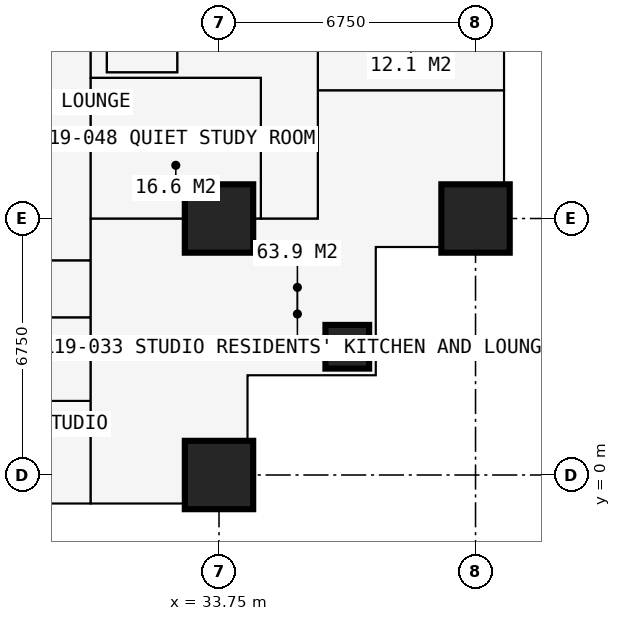
"""IFC4 building model, lengths in metres.
Left out: names, types, materials, properties, quantities, classifications, styles, units other than length and angle.
Written with IfcOpenShell. Run it as: python <this file> out.ifc"""

import sys

from ifc_helpers import new_model, si_unit, direction, frame, frame_2d, origin, origin_2d, place, context, subcontext, project, spatial, rectangle, extrude, element, fill, save


model = new_model("IFC4")
c1 = context("Model", 3, precision=1e-05, world=origin(), true_north=direction((0.0, 1.0)))
c2 = subcontext(c1, "Body", "Model", "MODEL_VIEW")
j1 = project(units=[si_unit("LENGTHUNIT", "METRE"), si_unit("PLANEANGLEUNIT", "RADIAN")], contexts=[c1])
p1 = place(None, origin())
s1 = spatial("IfcSite", under=j1, at=p1, CompositionType="ELEMENT")
p2 = place(p1, origin())
s2 = spatial("IfcBuilding", under=s1, at=p2, CompositionType="ELEMENT")
p3 = place(p2, frame((0.0, 0.0, 72.0)))
s3 = spatial("IfcBuildingStorey", under=s2, at=p3, CompositionType="ELEMENT", Elevation=72.0)
for number, where, z_axis, x_axis in (
    (1, (33.75, 0.0, 0.0), (0.0, 0.0, 1.0), (1.0, 0.0, 0.0)),
    (2, (33.75, 6.75, 0.0), (0.0, 0.0, 1.0), (1.0, 0.0, 0.0)),
):
    element("IfcColumn", number, at=place(p3, frame(where, z_axis=z_axis, x_axis=x_axis)), inside=s3, PredefinedType="COLUMN", context=c2, shape_type="SweptSolid", body=[
        extrude(rectangle(XDim=1.8, YDim=1.8, at=origin_2d()), origin(), (0.0, 0.0, 1.0), 3.6),
    ])
p4 = place(p3, frame((37.125, 3.375, 0.0), z_axis=(0.0, 0.0, 1.0), x_axis=(1.0, 0.0, 0.0)))
e3 = element("IfcColumn", 3, at=p4, inside=s3, PredefinedType="COLUMN", context=c2, shape_type="SweptSolid", body=[
    extrude(rectangle(XDim=1.15, YDim=1.15, at=origin_2d()), origin(), (0.0, 0.0, 1.0), 3.6),
])
p5 = place(p3, frame((40.5, 6.75, 0.0), z_axis=(0.0, 0.0, 1.0), x_axis=(1.0, 0.0, 0.0)))
e4 = element("IfcColumn", 4, at=p5, inside=s3, PredefinedType="COLUMN", context=c2, shape_type="SweptSolid", body=[
    extrude(rectangle(XDim=1.8, YDim=1.8, at=origin_2d()), origin(), (0.0, 0.0, 1.0), 3.6),
])
p6 = place(p3, frame((34.5, -0.75, 0.0), z_axis=(0.0, 0.0, 1.0), x_axis=(0.0, 1.0, 0.0)))
e5 = element("IfcWall", 5, at=p6, inside=s3, PredefinedType="SOLIDWALL", context=c2, shape_type="SweptSolid", body=[
    extrude(rectangle(XDim=3.375, YDim=0.3, at=frame_2d((1.688, 0.0))), origin(), (0.0, 0.0, 1.0), 3.3),
])
p7 = place(p6, frame((1.833, 0.0, 0.9)))
e6 = element("IfcOpeningElement", 6, at=p7, cuts=e5, PredefinedType="OPENING", context=c2, shape_type="SweptSolid", body=[
    extrude(rectangle(XDim=1.2, YDim=1.8, at=frame_2d((0.6, 0.9))), frame((0.0, 0.16, 0.0), z_axis=(0.0, -1.0, 0.0), x_axis=(1.0, 0.0, 0.0)), (0.0, 0.0, 1.0), 0.32),
])
p8 = place(p3, frame((34.5, 2.625, 0.0), z_axis=(0.0, 0.0, 1.0), x_axis=(1.0, 0.0, 0.0)))
e7 = element("IfcWall", 7, at=p8, inside=s3, PredefinedType="SOLIDWALL", context=c2, shape_type="SweptSolid", body=[
    extrude(rectangle(XDim=3.375, YDim=0.3, at=frame_2d((1.688, 0.0))), origin(), (0.0, 0.0, 1.0), 3.3),
])
p9 = place(p8, frame((0.788, 0.0, 0.6)))
e8 = element("IfcOpeningElement", 8, at=p9, cuts=e7, PredefinedType="OPENING", context=c2, shape_type="SweptSolid", body=[
    extrude(rectangle(XDim=1.8, YDim=2.1, at=frame_2d((0.9, 1.05))), frame((0.0, 0.16, 0.0), z_axis=(0.0, -1.0, 0.0), x_axis=(1.0, 0.0, 0.0)), (0.0, 0.0, 1.0), 0.32),
])
p10 = place(p3, frame((37.875, 2.625, 0.0), z_axis=(0.0, 0.0, 1.0), x_axis=(0.0, 1.0, 0.0)))
e9 = element("IfcWall", 9, at=p10, inside=s3, PredefinedType="SOLIDWALL", context=c2, shape_type="SweptSolid", body=[
    extrude(rectangle(XDim=3.375, YDim=0.3, at=frame_2d((1.688, 0.0))), origin(), (0.0, 0.0, 1.0), 3.3),
])
p11 = place(p10, frame((0.788, 0.0, 0.6)))
e10 = element("IfcOpeningElement", 10, at=p11, cuts=e9, PredefinedType="OPENING", context=c2, shape_type="SweptSolid", body=[
    extrude(rectangle(XDim=1.8, YDim=2.1, at=frame_2d((0.9, 1.05))), frame((0.0, 0.16, 0.0), z_axis=(0.0, -1.0, 0.0), x_axis=(1.0, 0.0, 0.0)), (0.0, 0.0, 1.0), 0.32),
])
p12 = place(p3, frame((37.875, 6.0, 0.0), z_axis=(0.0, 0.0, 1.0), x_axis=(1.0, 0.0, 0.0)))
e11 = element("IfcWall", 11, at=p12, inside=s3, PredefinedType="SOLIDWALL", context=c2, shape_type="SweptSolid", body=[
    extrude(rectangle(XDim=3.375, YDim=0.3, at=frame_2d((1.688, 0.0))), origin(), (0.0, 0.0, 1.0), 3.3),
])
p13 = place(p12, frame((0.343, 0.0, 0.9)))
e12 = element("IfcOpeningElement", 12, at=p13, cuts=e11, PredefinedType="OPENING", context=c2, shape_type="SweptSolid", body=[
    extrude(rectangle(XDim=1.2, YDim=1.8, at=frame_2d((0.6, 0.9))), frame((0.0, 0.16, 0.0), z_axis=(0.0, -1.0, 0.0), x_axis=(1.0, 0.0, 0.0)), (0.0, 0.0, 1.0), 0.32),
])
p14 = place(p3, frame((6.75, 4.15, 0.0), z_axis=(0.0, 0.0, 1.0), x_axis=(1.0, 0.0, 0.0)))
e13 = element("IfcWall", 13, at=p14, inside=s3, PredefinedType="PARTITIONING", context=c2, shape_type="SweptSolid", body=[
    extrude(rectangle(XDim=23.625, YDim=0.1, at=frame_2d((11.812, 0.0))), origin(), (0.0, 0.0, 1.0), 3.3),
])
p15 = place(p14, frame((0.2, 0.0, 0.0)))
e14 = element("IfcOpeningElement", 14, at=p15, cuts=e13, PredefinedType="OPENING", context=c2, shape_type="SweptSolid", body=[
    extrude(rectangle(XDim=0.95, YDim=2.2, at=frame_2d((0.475, 1.1))), frame((0.0, 0.06, 0.0), z_axis=(0.0, -1.0, 0.0), x_axis=(1.0, 0.0, 0.0)), (0.0, 0.0, 1.0), 0.12),
])
p16 = place(p14, frame((3.625, 0.0, 0.0)))
e15 = element("IfcOpeningElement", 15, at=p16, cuts=e13, PredefinedType="OPENING", context=c2, shape_type="SweptSolid", body=[
    extrude(rectangle(XDim=0.95, YDim=2.2, at=frame_2d((0.475, 1.1))), frame((0.0, 0.06, 0.0), z_axis=(0.0, -1.0, 0.0), x_axis=(1.0, 0.0, 0.0)), (0.0, 0.0, 1.0), 0.12),
])
p17 = place(p14, frame((15.1, 0.0, 0.0)))
e16 = element("IfcOpeningElement", 16, at=p17, cuts=e13, PredefinedType="OPENING", context=c2, shape_type="SweptSolid", body=[
    extrude(rectangle(XDim=0.95, YDim=2.2, at=frame_2d((0.475, 1.1))), frame((0.0, 0.06, 0.0), z_axis=(0.0, -1.0, 0.0), x_axis=(1.0, 0.0, 0.0)), (0.0, 0.0, 1.0), 0.12),
])
p18 = place(p14, frame((8.35, 0.0, 0.0)))
e17 = element("IfcOpeningElement", 17, at=p18, cuts=e13, PredefinedType="OPENING", context=c2, shape_type="SweptSolid", body=[
    extrude(rectangle(XDim=0.95, YDim=2.2, at=frame_2d((0.475, 1.1))), frame((0.0, 0.06, 0.0), z_axis=(0.0, -1.0, 0.0), x_axis=(1.0, 0.0, 0.0)), (0.0, 0.0, 1.0), 0.12),
])
p19 = place(p14, frame((20.5, 0.0, 0.0)))
e18 = element("IfcOpeningElement", 18, at=p19, cuts=e13, PredefinedType="OPENING", context=c2, shape_type="SweptSolid", body=[
    extrude(rectangle(XDim=0.95, YDim=2.2, at=frame_2d((0.475, 1.1))), frame((0.0, 0.06, 0.0), z_axis=(0.0, -1.0, 0.0), x_axis=(1.0, 0.0, 0.0)), (0.0, 0.0, 1.0), 0.12),
])
p20 = place(p3, frame((22.988, 5.65, 0.0), z_axis=(0.0, 0.0, 1.0), x_axis=(1.0, 0.0, 0.0)))
e19 = element("IfcWall", 19, at=p20, inside=s3, PredefinedType="PARTITIONING", context=c2, shape_type="SweptSolid", body=[
    extrude(rectangle(XDim=7.387, YDim=0.15, at=frame_2d((3.694, 0.0))), origin(), (0.0, 0.0, 1.0), 3.3),
])
p21 = place(p20, frame((2.0, 0.0, 0.0)))
e20 = element("IfcOpeningElement", 20, at=p21, cuts=e19, PredefinedType="OPENING", context=c2, shape_type="SweptSolid", body=[
    extrude(rectangle(XDim=0.95, YDim=2.2, at=frame_2d((0.475, 1.1))), frame((0.0, 0.085, 0.0), z_axis=(0.0, -1.0, 0.0), x_axis=(1.0, 0.0, 0.0)), (0.0, 0.0, 1.0), 0.17),
])
p22 = place(p3, frame((28.375, 1.95, 0.0), z_axis=(0.0, 0.0, 1.0), x_axis=(1.0, 0.0, 0.0)))
e21 = element("IfcWall", 21, at=p22, inside=s3, PredefinedType="PARTITIONING", context=c2, shape_type="SweptSolid", body=[
    extrude(rectangle(XDim=2.0, YDim=0.1, at=frame_2d((1.0, 0.0))), origin(), (0.0, 0.0, 1.0), 3.3),
])
p23 = place(p3, frame((30.375, -0.734, 0.0), z_axis=(0.0, 0.0, 1.0), x_axis=(0.0, 1.0, 0.0)))
e22 = element("IfcWall", 22, at=p23, inside=s3, PredefinedType="PARTITIONING", context=c2, shape_type="SweptSolid", body=[
    extrude(rectangle(XDim=12.034, YDim=0.15, at=frame_2d((6.017, 0.0))), origin(), (0.0, 0.0, 1.0), 3.3),
])
p24 = place(p23, frame((5.134, 0.0, 0.0)))
e23 = element("IfcOpeningElement", 23, at=p24, cuts=e22, PredefinedType="OPENING", context=c2, shape_type="SweptSolid", body=[
    extrude(rectangle(XDim=1.0, YDim=2.2, at=frame_2d((0.5, 1.1))), frame((0.0, 0.085, 0.0), z_axis=(0.0, -1.0, 0.0), x_axis=(1.0, 0.0, 0.0)), (0.0, 0.0, 1.0), 0.17),
])
p25 = place(p3, frame((30.375, 6.75, 0.0), z_axis=(0.0, 0.0, 1.0), x_axis=(1.0, 0.0, 0.0)))
e24 = element("IfcWall", 24, at=p25, inside=s3, PredefinedType="PARTITIONING", context=c2, shape_type="SweptSolid", body=[
    extrude(rectangle(XDim=5.975, YDim=0.15, at=frame_2d((2.988, 0.0))), origin(), (0.0, 0.0, 1.0), 2.802),
])
p26 = place(p3, frame((30.375, 10.45, 0.0), z_axis=(0.0, 0.0, 1.0), x_axis=(1.0, 0.0, 0.0)))
e25 = element("IfcWall", 25, at=p26, inside=s3, PredefinedType="PARTITIONING", context=c2, shape_type="SweptSolid", body=[
    extrude(rectangle(XDim=4.475, YDim=0.15, at=frame_2d((2.238, 0.0))), origin(), (0.0, 0.0, 1.0), 3.3),
])
p27 = place(p26, frame((2.35, 0.0, 0.0)))
e26 = element("IfcOpeningElement", 26, at=p27, cuts=e25, PredefinedType="OPENING", context=c2, shape_type="SweptSolid", body=[
    extrude(rectangle(XDim=0.95, YDim=2.2, at=frame_2d((0.475, 1.1))), frame((0.0, 0.085, 0.0), z_axis=(0.0, -1.0, 0.0), x_axis=(1.0, 0.0, 0.0)), (0.0, 0.0, 1.0), 0.17),
])
p28 = place(p3, frame((30.8, 10.6, 0.0), z_axis=(0.0, 0.0, 1.0), x_axis=(0.0, 1.0, 0.0)))
e27 = element("IfcWall", 27, at=p28, inside=s3, PredefinedType="PARTITIONING", context=c2, shape_type="SweptSolid", body=[
    extrude(rectangle(XDim=0.7, YDim=0.15, at=frame_2d((0.35, 0.0))), origin(), (0.0, 0.0, 1.0), 3.3),
])
p29 = place(p3, frame((30.8, 10.6, 0.0), z_axis=(0.0, 0.0, 1.0), x_axis=(1.0, 0.0, 0.0)))
e28 = element("IfcWall", 28, at=p29, inside=s3, PredefinedType="PARTITIONING", context=c2, shape_type="SweptSolid", body=[
    extrude(rectangle(XDim=1.85, YDim=0.15, at=frame_2d((0.925, 0.0))), origin(), (0.0, 0.0, 1.0), 3.3),
])
p30 = place(p3, frame((32.65, 10.6, 0.0), z_axis=(0.0, 0.0, 1.0), x_axis=(0.0, 1.0, 0.0)))
e29 = element("IfcWall", 29, at=p30, inside=s3, PredefinedType="SHEAR", context=c2, shape_type="SweptSolid", body=[
    extrude(rectangle(XDim=9.3, YDim=0.1, at=frame_2d((4.65, 0.0))), origin(), (0.0, 0.0, 1.0), 3.3),
])
p31 = place(p30, frame((0.5, 0.0, 0.0)))
e30 = element("IfcOpeningElement", 30, at=p31, cuts=e29, PredefinedType="OPENING", context=c2, shape_type="SweptSolid", body=[
    extrude(rectangle(XDim=1.0, YDim=2.2, at=frame_2d((0.5, 1.1))), frame((0.0, 0.06, 0.0), z_axis=(0.0, -1.0, 0.0), x_axis=(1.0, 0.0, 0.0)), (0.0, 0.0, 1.0), 0.12),
])
p32 = place(p3, frame((34.85, 6.75, 0.0), z_axis=(0.0, 0.0, 1.0), x_axis=(0.0, 1.0, 0.0)))
e31 = element("IfcWall", 31, at=p32, inside=s3, PredefinedType="PARTITIONING", context=c2, shape_type="SweptSolid", body=[
    extrude(rectangle(XDim=3.7, YDim=0.15, at=frame_2d((1.85, 0.0))), origin(), (0.0, 0.0, 1.0), 3.3),
])
p33 = place(p3, frame((36.35, 6.75, 0.0), z_axis=(0.0, 0.0, 1.0), x_axis=(0.0, 1.0, 0.0)))
e32 = element("IfcWall", 32, at=p33, inside=s3, PredefinedType="PARTITIONING", context=c2, shape_type="SweptSolid", body=[
    extrude(rectangle(XDim=23.625, YDim=0.1, at=frame_2d((11.812, 0.0))), origin(), (0.0, 0.0, 1.0), 3.3),
])
p34 = place(p33, frame((3.575, 0.0, 0.0)))
e33 = element("IfcOpeningElement", 33, at=p34, cuts=e32, PredefinedType="OPENING", context=c2, shape_type="SweptSolid", body=[
    extrude(rectangle(XDim=0.95, YDim=2.2, at=frame_2d((0.475, 1.1))), frame((0.0, 0.06, 0.0), z_axis=(0.0, -1.0, 0.0), x_axis=(1.0, 0.0, 0.0)), (0.0, 0.0, 1.0), 0.12),
])
p35 = place(p33, frame((7.0, 0.0, 0.0)))
e34 = element("IfcOpeningElement", 34, at=p35, cuts=e32, PredefinedType="OPENING", context=c2, shape_type="SweptSolid", body=[
    extrude(rectangle(XDim=0.95, YDim=2.2, at=frame_2d((0.475, 1.1))), frame((0.0, 0.06, 0.0), z_axis=(0.0, -1.0, 0.0), x_axis=(1.0, 0.0, 0.0)), (0.0, 0.0, 1.0), 0.12),
])
p36 = place(p33, frame((10.375, 0.0, 0.0)))
e35 = element("IfcOpeningElement", 35, at=p36, cuts=e32, PredefinedType="OPENING", context=c2, shape_type="SweptSolid", body=[
    extrude(rectangle(XDim=0.95, YDim=2.2, at=frame_2d((0.475, 1.1))), frame((0.0, 0.06, 0.0), z_axis=(0.0, -1.0, 0.0), x_axis=(1.0, 0.0, 0.0)), (0.0, 0.0, 1.0), 0.12),
])
p37 = place(p33, frame((13.75, 0.0, 0.0)))
e36 = element("IfcOpeningElement", 36, at=p37, cuts=e32, PredefinedType="OPENING", context=c2, shape_type="SweptSolid", body=[
    extrude(rectangle(XDim=0.95, YDim=2.2, at=frame_2d((0.475, 1.1))), frame((0.0, 0.06, 0.0), z_axis=(0.0, -1.0, 0.0), x_axis=(1.0, 0.0, 0.0)), (0.0, 0.0, 1.0), 0.12),
])
p38 = place(p33, frame((17.125, 0.0, 0.0)))
e37 = element("IfcOpeningElement", 37, at=p38, cuts=e32, PredefinedType="OPENING", context=c2, shape_type="SweptSolid", body=[
    extrude(rectangle(XDim=0.95, YDim=2.2, at=frame_2d((0.475, 1.1))), frame((0.0, 0.06, 0.0), z_axis=(0.0, -1.0, 0.0), x_axis=(1.0, 0.0, 0.0)), (0.0, 0.0, 1.0), 0.12),
])
p39 = place(p33, frame((20.5, 0.0, 0.0)))
e38 = element("IfcOpeningElement", 38, at=p39, cuts=e32, PredefinedType="OPENING", context=c2, shape_type="SweptSolid", body=[
    extrude(rectangle(XDim=0.95, YDim=2.2, at=frame_2d((0.475, 1.1))), frame((0.0, 0.06, 0.0), z_axis=(0.0, -1.0, 0.0), x_axis=(1.0, 0.0, 0.0)), (0.0, 0.0, 1.0), 0.12),
])
p40 = place(p3, frame((36.35, 10.125, 0.0), z_axis=(0.0, 0.0, 1.0), x_axis=(1.0, 0.0, 0.0)))
e39 = element("IfcWall", 39, at=p40, inside=s3, PredefinedType="PARTITIONING", context=c2, shape_type="SweptSolid", body=[
    extrude(rectangle(XDim=4.884, YDim=0.15, at=frame_2d((2.442, 0.0))), origin(), (0.0, 0.0, 1.0), 3.3),
])
p41 = place(p7, origin())
e40 = element("IfcWindow", 40, at=p41, inside=s3, PartitioningType="SINGLE_PANEL", PredefinedType="WINDOW", context=c2, shape_type="SweptSolid", body=[
    extrude(rectangle(XDim=1.2, YDim=1.8, at=frame_2d((0.6, 0.9))), frame((0.0, 0.03, 0.0), z_axis=(0.0, -1.0, 0.0), x_axis=(1.0, 0.0, 0.0)), (0.0, 0.0, 1.0), 0.06),
])
fill(e6, e40)
p42 = place(p9, origin())
e41 = element("IfcWindow", 41, at=p42, inside=s3, PartitioningType="SINGLE_PANEL", PredefinedType="WINDOW", context=c2, shape_type="SweptSolid", body=[
    extrude(rectangle(XDim=1.8, YDim=2.1, at=frame_2d((0.9, 1.05))), frame((0.0, 0.03, 0.0), z_axis=(0.0, -1.0, 0.0), x_axis=(1.0, 0.0, 0.0)), (0.0, 0.0, 1.0), 0.06),
])
fill(e8, e41)
p43 = place(p11, origin())
e42 = element("IfcWindow", 42, at=p43, inside=s3, PartitioningType="SINGLE_PANEL", PredefinedType="WINDOW", context=c2, shape_type="SweptSolid", body=[
    extrude(rectangle(XDim=1.8, YDim=2.1, at=frame_2d((0.9, 1.05))), frame((0.0, 0.03, 0.0), z_axis=(0.0, -1.0, 0.0), x_axis=(1.0, 0.0, 0.0)), (0.0, 0.0, 1.0), 0.06),
])
fill(e10, e42)
p44 = place(p13, origin())
e43 = element("IfcWindow", 43, at=p44, inside=s3, PartitioningType="SINGLE_PANEL", PredefinedType="WINDOW", context=c2, shape_type="SweptSolid", body=[
    extrude(rectangle(XDim=1.2, YDim=1.8, at=frame_2d((0.6, 0.9))), frame((0.0, 0.03, 0.0), z_axis=(0.0, -1.0, 0.0), x_axis=(1.0, 0.0, 0.0)), (0.0, 0.0, 1.0), 0.06),
])
fill(e12, e43)
p45 = place(p24, origin())
e44 = element("IfcDoor", 44, at=p45, inside=s3, OperationType="SINGLE_SWING_LEFT", PredefinedType="DOOR", context=c2, shape_type="SweptSolid", body=[
    extrude(rectangle(XDim=1.0, YDim=2.2, at=frame_2d((0.5, 1.1))), frame((0.0, 0.025, 0.0), z_axis=(0.0, -1.0, 0.0), x_axis=(1.0, 0.0, 0.0)), (0.0, 0.0, 1.0), 0.05),
])
fill(e23, e44)
p46 = place(p34, origin())
e45 = element("IfcDoor", 45, at=p46, inside=s3, OperationType="SINGLE_SWING_LEFT", PredefinedType="DOOR", context=c2, shape_type="SweptSolid", body=[
    extrude(rectangle(XDim=0.95, YDim=2.2, at=frame_2d((0.475, 1.1))), frame((0.0, 0.025, 0.0), z_axis=(0.0, -1.0, 0.0), x_axis=(1.0, 0.0, 0.0)), (0.0, 0.0, 1.0), 0.05),
])
fill(e33, e45)
p47 = place(p31, origin())
e46 = element("IfcDoor", 46, at=p47, inside=s3, OperationType="SINGLE_SWING_LEFT", PredefinedType="DOOR", context=c2, shape_type="SweptSolid", body=[
    extrude(rectangle(XDim=1.0, YDim=2.2, at=frame_2d((0.5, 1.1))), frame((0.0, 0.025, 0.0), z_axis=(0.0, -1.0, 0.0), x_axis=(1.0, 0.0, 0.0)), (0.0, 0.0, 1.0), 0.05),
])
fill(e30, e46)
p48 = place(p27, origin())
e47 = element("IfcDoor", 47, at=p48, inside=s3, OperationType="SINGLE_SWING_LEFT", PredefinedType="DOOR", context=c2, shape_type="SweptSolid", body=[
    extrude(rectangle(XDim=0.95, YDim=2.2, at=frame_2d((0.475, 1.1))), frame((0.0, 0.025, 0.0), z_axis=(0.0, -1.0, 0.0), x_axis=(1.0, 0.0, 0.0)), (0.0, 0.0, 1.0), 0.05),
])
fill(e26, e47)
save(model, sys.argv[1])
